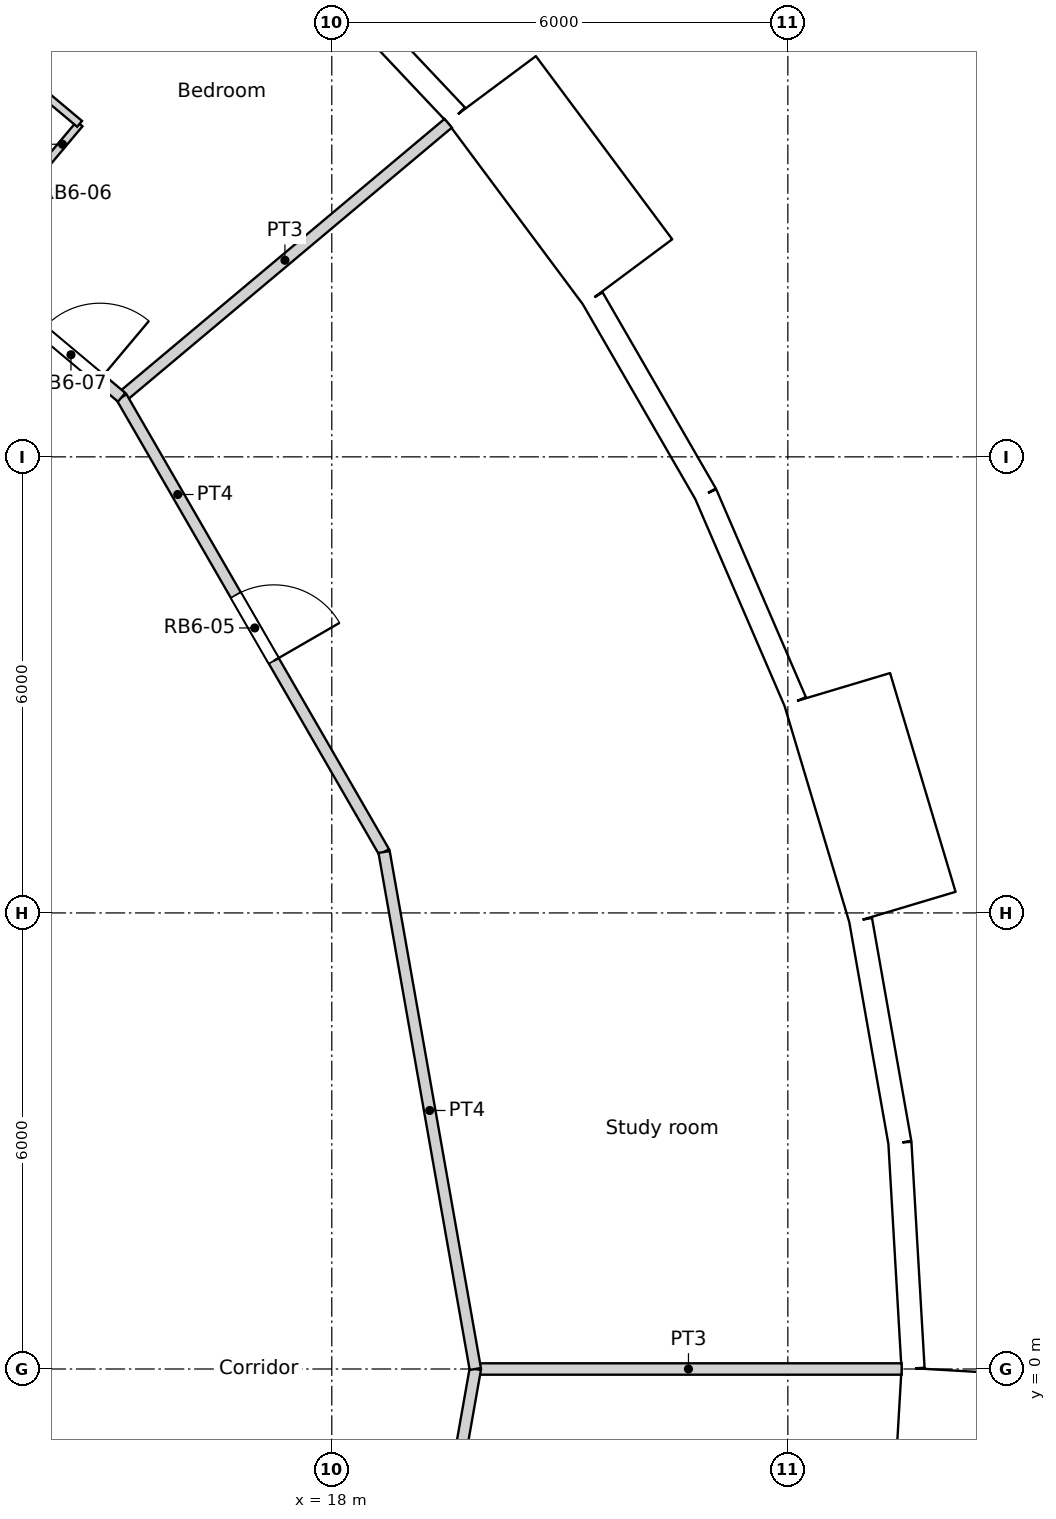
"""IFC4 building model, lengths in metres.
Left out: names, types, materials, properties, quantities, classifications, styles, units other than length and angle.
Written with IfcOpenShell. Run it as: python <this file> out.ifc"""

import sys

from ifc_helpers import new_model, si_unit, direction, frame, frame_2d, origin, origin_2d, place, context, subcontext, project, spatial, rectangle, circle, extrude, element, fill, save


model = new_model("IFC4")
c1 = context("Model", 3, precision=1e-05, world=origin(), true_north=direction((0.0, 1.0)))
c2 = subcontext(c1, "Body", "Model", "MODEL_VIEW")
j1 = project(units=[si_unit("LENGTHUNIT", "METRE"), si_unit("PLANEANGLEUNIT", "RADIAN")], contexts=[c1])
p1 = place(None, origin())
s1 = spatial("IfcSite", under=j1, at=p1, CompositionType="ELEMENT")
p2 = place(p1, origin())
s2 = spatial("IfcBuilding", under=s1, at=p2, CompositionType="ELEMENT")
p3 = place(p2, frame((0.0, 0.0, 180.0)))
s3 = spatial("IfcBuildingStorey", under=s2, at=p3, CompositionType="ELEMENT", Elevation=180.0)
for number, where, z_axis, x_axis in (
    (1, (24.548, 0.0, 0.0), (0.0, 0.0, 1.0), (1.0, 0.0, 0.0)),
    (2, (23.886, 5.661, 0.0), (0.0, 0.0, 1.0), (1.0, 0.0, 0.0)),
    (3, (21.937, 11.017, 0.0), (0.0, 0.0, 1.0), (1.0, 0.0, 0.0)),
    (4, (18.805, 15.779, 0.0), (0.0, 0.0, 1.0), (1.0, 0.0, 0.0)),
):
    element("IfcColumn", number, at=place(p3, frame(where, z_axis=z_axis, x_axis=x_axis)), inside=s3, PredefinedType="COLUMN", context=c2, shape_type="SweptSolid", body=[
        extrude(circle(Radius=0.6, at=origin_2d()), origin(), (0.0, 0.0, 1.0), 3.6),
    ])
for number, where, z_axis, x_axis in (
    (5, (18.822, 0.0, 0.0), (0.0, 0.0, 1.0), (1.0, 0.0, 0.0)),
    (6, (17.986, 5.548, 0.0), (0.0, 0.0, 1.0), (1.0, 0.0, 0.0)),
    (7, (15.552, 10.603, 0.0), (0.0, 0.0, 1.0), (1.0, 0.0, 0.0)),
):
    element("IfcColumn", number, at=place(p3, frame(where, z_axis=z_axis, x_axis=x_axis)), inside=s3, PredefinedType="COLUMN", context=c2, shape_type="SweptSolid", body=[
        extrude(circle(Radius=0.65, at=origin_2d()), origin(), (0.0, 0.0, 1.0), 3.6),
    ])
p4 = place(p3, frame((25.647, 0.01, 0.0), z_axis=(0.0, 0.0, 1.0), x_axis=(-0.058139540521, 0.998308466271, 0.0)))
e8 = element("IfcWall", 8, at=p4, inside=s3, PredefinedType="SOLIDWALL", context=c2, shape_type="SweptSolid", body=[
    extrude(rectangle(XDim=2.973, YDim=0.3, at=frame_2d((1.487, 0.0))), origin(), (0.0, 0.0, 1.0), 3.3),
])
p5 = place(p4, frame((1.486, 0.0, 1.55)))
e9 = element("IfcOpeningElement", 9, at=p5, cuts=e8, PredefinedType="OPENING", context=c2, shape_type="SweptSolid", body=[
    extrude(circle(Radius=0.9, at=origin_2d()), frame((0.0, 0.16, 0.0), z_axis=(0.0, -1.0, 0.0), x_axis=(1.0, 0.0, 0.0)), (0.0, 0.0, 1.0), 0.32),
])
p6 = place(p3, frame((25.474, 2.978, 0.0), z_axis=(0.0, 0.0, 1.0), x_axis=(-0.173686952598, 0.984800915159, 0.0)))
e10 = element("IfcWall", 10, at=p6, inside=s3, PredefinedType="SOLIDWALL", context=c2, shape_type="SweptSolid", body=[
    extrude(rectangle(XDim=2.973, YDim=0.3, at=frame_2d((1.486, 0.0))), origin(), (0.0, 0.0, 1.0), 3.3),
])
p7 = place(p6, frame((1.486, 0.0, 1.55)))
e11 = element("IfcOpeningElement", 11, at=p7, cuts=e10, PredefinedType="OPENING", context=c2, shape_type="SweptSolid", body=[
    extrude(circle(Radius=0.9, at=origin_2d()), frame((0.0, 0.16, 0.0), z_axis=(0.0, -1.0, 0.0), x_axis=(1.0, 0.0, 0.0)), (0.0, 0.0, 1.0), 0.32),
])
p8 = place(p3, frame((25.51, 6.071, -0.3), z_axis=(0.0, 0.0, 1.0), x_axis=(-0.286780420304, 0.957996341606, 0.0)))
e12 = element("IfcWall", 12, at=p8, inside=s3, PredefinedType="ELEMENTEDWALL", context=c2, shape_type="SweptSolid", body=[
    extrude(rectangle(XDim=3.0, YDim=1.45, at=frame_2d((1.5, 0.0))), origin(), (0.0, 0.0, 1.0), 3.6),
])
p9 = place(p8, frame((1.5, 0.0, 1.85)))
e13 = element("IfcOpeningElement", 13, at=p9, cuts=e12, PredefinedType="OPENING", context=c2, shape_type="SweptSolid", body=[
    extrude(circle(Radius=0.9, at=origin_2d()), frame((0.0, 0.735, 0.0), z_axis=(0.0, -1.0, 0.0), x_axis=(1.0, 0.0, 0.0)), (0.0, 0.0, 1.0), 1.47),
])
p10 = place(p3, frame((24.097, 8.781, 0.0), z_axis=(0.0, 0.0, 1.0), x_axis=(-0.396078892785, 0.918216483565, 0.0)))
e14 = element("IfcWall", 14, at=p10, inside=s3, PredefinedType="SOLIDWALL", context=c2, shape_type="SweptSolid", body=[
    extrude(rectangle(XDim=2.973, YDim=0.3, at=frame_2d((1.486, 0.0))), origin(), (0.0, 0.0, 1.0), 3.3),
])
p11 = place(p10, frame((1.486, 0.0, 1.55)))
e15 = element("IfcOpeningElement", 15, at=p11, cuts=e14, PredefinedType="OPENING", context=c2, shape_type="SweptSolid", body=[
    extrude(circle(Radius=0.9, at=origin_2d()), frame((0.0, 0.16, 0.0), z_axis=(0.0, -1.0, 0.0), x_axis=(1.0, 0.0, 0.0)), (0.0, 0.0, 1.0), 0.32),
])
p12 = place(p3, frame((22.919, 11.51, 0.0), z_axis=(0.0, 0.0, 1.0), x_axis=(-0.500016263033, 0.866016014115, 0.0)))
e16 = element("IfcWall", 16, at=p12, inside=s3, PredefinedType="SOLIDWALL", context=c2, shape_type="SweptSolid", body=[
    extrude(rectangle(XDim=2.973, YDim=0.3, at=frame_2d((1.487, 0.0))), origin(), (0.0, 0.0, 1.0), 3.3),
])
p13 = place(p12, frame((1.486, 0.0, 1.55)))
e17 = element("IfcOpeningElement", 17, at=p13, cuts=e16, PredefinedType="OPENING", context=c2, shape_type="SweptSolid", body=[
    extrude(circle(Radius=0.9, at=origin_2d()), frame((0.0, 0.16, 0.0), z_axis=(0.0, -1.0, 0.0), x_axis=(1.0, 0.0, 0.0)), (0.0, 0.0, 1.0), 0.32),
])
p14 = place(p3, frame((21.895, 14.43, -0.3), z_axis=(0.0, 0.0, 1.0), x_axis=(-0.597183717734, 0.802104486506, 0.0)))
e18 = element("IfcWall", 18, at=p14, inside=s3, PredefinedType="ELEMENTEDWALL", context=c2, shape_type="SweptSolid", body=[
    extrude(rectangle(XDim=3.0, YDim=1.45, at=frame_2d((1.5, 0.0))), origin(), (0.0, 0.0, 1.0), 3.6),
])
p15 = place(p14, frame((1.5, 0.0, 1.85)))
e19 = element("IfcOpeningElement", 19, at=p15, cuts=e18, PredefinedType="OPENING", context=c2, shape_type="SweptSolid", body=[
    extrude(circle(Radius=0.9, at=origin_2d()), frame((0.0, 0.735, 0.0), z_axis=(0.0, -1.0, 0.0), x_axis=(1.0, 0.0, 0.0)), (0.0, 0.0, 1.0), 1.47),
])
p16 = place(p3, frame((19.64, 16.493, 0.0), z_axis=(0.0, 0.0, 1.0), x_axis=(-0.686235184166, 0.727379730273, 0.0)))
e20 = element("IfcWall", 20, at=p16, inside=s3, PredefinedType="SOLIDWALL", context=c2, shape_type="SweptSolid", body=[
    extrude(rectangle(XDim=2.973, YDim=0.3, at=frame_2d((1.486, 0.0))), origin(), (0.0, 0.0, 1.0), 3.3),
])
p17 = place(p16, frame((1.486, 0.0, 1.55)))
e21 = element("IfcOpeningElement", 21, at=p17, cuts=e20, PredefinedType="OPENING", context=c2, shape_type="SweptSolid", body=[
    extrude(circle(Radius=0.9, at=origin_2d()), frame((0.0, 0.16, 0.0), z_axis=(0.0, -1.0, 0.0), x_axis=(1.0, 0.0, 0.0)), (0.0, 0.0, 1.0), 0.32),
])
p18 = place(p3, frame((26.048, -3.02, -0.3), z_axis=(0.0, 0.0, 1.0), x_axis=(0.058106596105, 0.998310384344, 0.0)))
e22 = element("IfcWall", 22, at=p18, inside=s3, PredefinedType="ELEMENTEDWALL", context=c2, shape_type="SweptSolid", body=[
    extrude(rectangle(XDim=3.0, YDim=1.45, at=frame_2d((1.5, 0.0))), origin(), (0.0, 0.0, 1.0), 3.6),
])
p19 = place(p18, frame((1.5, 0.0, 1.85)))
e23 = element("IfcOpeningElement", 23, at=p19, cuts=e22, PredefinedType="OPENING", context=c2, shape_type="SweptSolid", body=[
    extrude(circle(Radius=0.9, at=origin_2d()), frame((0.0, 0.735, 0.0), z_axis=(0.0, -1.0, 0.0), x_axis=(1.0, 0.0, 0.0)), (0.0, 0.0, 1.0), 1.47),
])
p20 = place(p3, frame((15.235, 12.784, 0.0), z_axis=(0.0, 0.0, 1.0), x_axis=(0.499914202267, -0.866074933462, 0.0)))
e24 = element("IfcWall", 24, at=p20, inside=s3, PredefinedType="PARTITIONING", context=c2, shape_type="SweptSolid", body=[
    extrude(rectangle(XDim=6.907, YDim=0.15, at=frame_2d((3.454, 0.0))), origin(), (0.0, 0.0, 1.0), 3.3),
])
p21 = place(p20, frame((3.004, 0.0, 0.0)))
e25 = element("IfcOpeningElement", 25, at=p21, cuts=e24, PredefinedType="OPENING", context=c2, shape_type="SweptSolid", body=[
    extrude(rectangle(XDim=1.0, YDim=2.04, at=frame_2d((0.5, 1.02))), frame((0.0, 0.075, 0.0), z_axis=(0.0, -1.0, 0.0), x_axis=(1.0, 0.0, 0.0)), (0.0, 0.0, 1.0), 0.15),
])
p22 = place(p3, frame((18.688, 6.802, 0.0), z_axis=(0.0, 0.0, 1.0), x_axis=(0.173728873845, -0.98479352069, 0.0)))
e26 = element("IfcWall", 26, at=p22, inside=s3, PredefinedType="PARTITIONING", context=c2, shape_type="SweptSolid", body=[
    extrude(rectangle(XDim=6.907, YDim=0.15, at=frame_2d((3.454, 0.0))), origin(), (0.0, 0.0, 1.0), 3.3),
])
p23 = place(p3, frame((9.943, 17.222, 0.0), z_axis=(0.0, 0.0, 1.0), x_axis=(0.766192104565, -0.642611592567, 0.0)))
e27 = element("IfcWall", 27, at=p23, inside=s3, PredefinedType="PARTITIONING", context=c2, shape_type="SweptSolid", body=[
    extrude(rectangle(XDim=6.906, YDim=0.15, at=frame_2d((3.453, 0.0))), origin(), (0.0, 0.0, 1.0), 3.3),
])
p24 = place(p23, frame((5.537, 0.0, 0.0)))
e28 = element("IfcOpeningElement", 28, at=p24, cuts=e27, PredefinedType="OPENING", context=c2, shape_type="SweptSolid", body=[
    extrude(rectangle(XDim=1.0, YDim=2.1, at=frame_2d((0.5, 1.05))), frame((0.0, 0.075, 0.0), z_axis=(0.0, -1.0, 0.0), x_axis=(1.0, 0.0, 0.0)), (0.0, 0.0, 1.0), 0.15),
])
p25 = place(p3, frame((18.688, -6.802, 0.0), z_axis=(0.0, 0.0, 1.0), x_axis=(0.173728873845, 0.98479352069, 0.0)))
e29 = element("IfcWall", 29, at=p25, inside=s3, PredefinedType="PARTITIONING", context=c2, shape_type="SweptSolid", body=[
    extrude(rectangle(XDim=6.907, YDim=0.15, at=frame_2d((3.454, 0.0))), origin(), (0.0, 0.0, 1.0), 3.3),
])
p26 = place(p3, frame((15.235, 12.784, 0.0), z_axis=(0.0, 0.0, 1.0), x_axis=(0.76609059793, 0.642732600514, 0.0)))
e30 = element("IfcWall", 30, at=p26, inside=s3, PredefinedType="PARTITIONING", context=c2, shape_type="SweptSolid", body=[
    extrude(rectangle(XDim=5.609, YDim=0.15, at=frame_2d((2.804, 0.0))), origin(), (0.0, 0.0, 1.0), 3.3),
])
p27 = place(p3, frame((19.888, 0.0, 0.0), z_axis=(0.0, 0.0, 1.0), x_axis=(1.0, 0.0, 0.0)))
e31 = element("IfcWall", 31, at=p27, inside=s3, PredefinedType="PARTITIONING", context=c2, shape_type="SweptSolid", body=[
    extrude(rectangle(XDim=5.609, YDim=0.15, at=frame_2d((2.805, 0.0))), origin(), (0.0, 0.0, 1.0), 3.3),
])
p28 = place(p3, frame((13.139, 14.542, 0.0), z_axis=(0.0, 0.0, 1.0), x_axis=(0.642731657745, 0.766091388891, 0.0)))
e32 = element("IfcWall", 32, at=p28, inside=s3, PredefinedType="PARTITIONING", context=c2, shape_type="SweptSolid", body=[
    extrude(rectangle(XDim=2.401, YDim=0.1, at=frame_2d((1.2, 0.0))), origin(), (0.0, 0.0, 1.0), 3.3),
])
p29 = place(p28, frame((0.75, 0.0, 0.0)))
e33 = element("IfcOpeningElement", 33, at=p29, cuts=e32, PredefinedType="OPENING", context=c2, shape_type="SweptSolid", body=[
    extrude(rectangle(XDim=0.9, YDim=2.04, at=frame_2d((0.45, 1.02))), frame((0.0, 0.05, 0.0), z_axis=(0.0, -1.0, 0.0), x_axis=(1.0, 0.0, 0.0)), (0.0, 0.0, 1.0), 0.1),
])
p30 = place(p3, frame((13.151, 17.665, 0.0), z_axis=(0.0, 0.0, 1.0), x_axis=(0.766224532916, -0.642572925945, 0.0)))
e34 = element("IfcWall", 34, at=p30, inside=s3, PredefinedType="PARTITIONING", context=c2, shape_type="SweptSolid", body=[
    extrude(rectangle(XDim=1.998, YDim=0.1, at=frame_2d((0.999, 0.0))), origin(), (0.0, 0.0, 1.0), 3.3),
])
p31 = place(p3, frame((11.716, 15.737, 0.0), z_axis=(0.0, 0.0, 1.0), x_axis=(0.597198494348, 0.802093484793, 0.0)))
e35 = element("IfcWall", 35, at=p31, inside=s3, PredefinedType="PARTITIONING", context=c2, shape_type="SweptSolid", body=[
    extrude(rectangle(XDim=5.878, YDim=0.15, at=frame_2d((2.939, 0.0))), origin(), (0.0, 0.0, 1.0), 3.3),
])
p32 = place(p5, origin())
e36 = element("IfcWindow", 36, at=p32, inside=s3, PartitioningType="SINGLE_PANEL", PredefinedType="WINDOW", context=c2, shape_type="SweptSolid", body=[
    extrude(circle(Radius=0.9, at=origin_2d()), frame((0.0, 0.12, 0.0), z_axis=(0.0, -1.0, 0.0), x_axis=(1.0, 0.0, 0.0)), (0.0, 0.0, 1.0), 0.1),
])
fill(e9, e36)
p33 = place(p7, origin())
e37 = element("IfcWindow", 37, at=p33, inside=s3, PartitioningType="SINGLE_PANEL", PredefinedType="WINDOW", context=c2, shape_type="SweptSolid", body=[
    extrude(circle(Radius=0.9, at=origin_2d()), frame((0.0, 0.12, 0.0), z_axis=(0.0, -1.0, 0.0), x_axis=(1.0, 0.0, 0.0)), (0.0, 0.0, 1.0), 0.1),
])
fill(e11, e37)
p34 = place(p9, origin())
e38 = element("IfcWindow", 38, at=p34, inside=s3, PartitioningType="SINGLE_PANEL", PredefinedType="WINDOW", context=c2, shape_type="SweptSolid", body=[
    extrude(circle(Radius=0.9, at=origin_2d()), frame((0.0, 0.695, 0.0), z_axis=(0.0, -1.0, 0.0), x_axis=(1.0, 0.0, 0.0)), (0.0, 0.0, 1.0), 0.1),
])
fill(e13, e38)
p35 = place(p11, origin())
e39 = element("IfcWindow", 39, at=p35, inside=s3, PartitioningType="SINGLE_PANEL", PredefinedType="WINDOW", context=c2, shape_type="SweptSolid", body=[
    extrude(circle(Radius=0.9, at=origin_2d()), frame((0.0, 0.12, 0.0), z_axis=(0.0, -1.0, 0.0), x_axis=(1.0, 0.0, 0.0)), (0.0, 0.0, 1.0), 0.1),
])
fill(e15, e39)
p36 = place(p13, origin())
e40 = element("IfcWindow", 40, at=p36, inside=s3, PartitioningType="SINGLE_PANEL", PredefinedType="WINDOW", context=c2, shape_type="SweptSolid", body=[
    extrude(circle(Radius=0.9, at=origin_2d()), frame((0.0, 0.12, 0.0), z_axis=(0.0, -1.0, 0.0), x_axis=(1.0, 0.0, 0.0)), (0.0, 0.0, 1.0), 0.1),
])
fill(e17, e40)
p37 = place(p15, origin())
e41 = element("IfcWindow", 41, at=p37, inside=s3, PartitioningType="SINGLE_PANEL", PredefinedType="WINDOW", context=c2, shape_type="SweptSolid", body=[
    extrude(circle(Radius=0.9, at=origin_2d()), frame((0.0, 0.695, 0.0), z_axis=(0.0, -1.0, 0.0), x_axis=(1.0, 0.0, 0.0)), (0.0, 0.0, 1.0), 0.1),
])
fill(e19, e41)
p38 = place(p17, origin())
e42 = element("IfcWindow", 42, at=p38, inside=s3, PartitioningType="SINGLE_PANEL", PredefinedType="WINDOW", context=c2, shape_type="SweptSolid", body=[
    extrude(circle(Radius=0.9, at=origin_2d()), frame((0.0, 0.12, 0.0), z_axis=(0.0, -1.0, 0.0), x_axis=(1.0, 0.0, 0.0)), (0.0, 0.0, 1.0), 0.1),
])
fill(e21, e42)
p39 = place(p19, origin())
e43 = element("IfcWindow", 43, at=p39, inside=s3, PartitioningType="SINGLE_PANEL", PredefinedType="WINDOW", context=c2, shape_type="SweptSolid", body=[
    extrude(circle(Radius=0.9, at=origin_2d()), frame((0.0, 0.695, 0.0), z_axis=(0.0, -1.0, 0.0), x_axis=(1.0, 0.0, 0.0)), (0.0, 0.0, 1.0), 0.1),
])
fill(e23, e43)
p40 = place(p21, origin())
e44 = element("IfcDoor", 44, at=p40, inside=s3, OperationType="SINGLE_SWING_RIGHT", PredefinedType="DOOR", context=c2, shape_type="SweptSolid", body=[
    extrude(rectangle(XDim=1.0, YDim=2.04, at=frame_2d((0.5, 1.02))), frame((0.0, 0.025, 0.0), z_axis=(0.0, -1.0, 0.0), x_axis=(1.0, 0.0, 0.0)), (0.0, 0.0, 1.0), 0.05),
])
fill(e25, e44)
p41 = place(p24, origin())
e45 = element("IfcDoor", 45, at=p41, inside=s3, OperationType="SINGLE_SWING_RIGHT", PredefinedType="DOOR", context=c2, shape_type="SweptSolid", body=[
    extrude(rectangle(XDim=1.0, YDim=2.1, at=frame_2d((0.5, 1.05))), frame((0.0, 0.025, 0.0), z_axis=(0.0, -1.0, 0.0), x_axis=(1.0, 0.0, 0.0)), (0.0, 0.0, 1.0), 0.05),
])
fill(e28, e45)
save(model, sys.argv[1])
